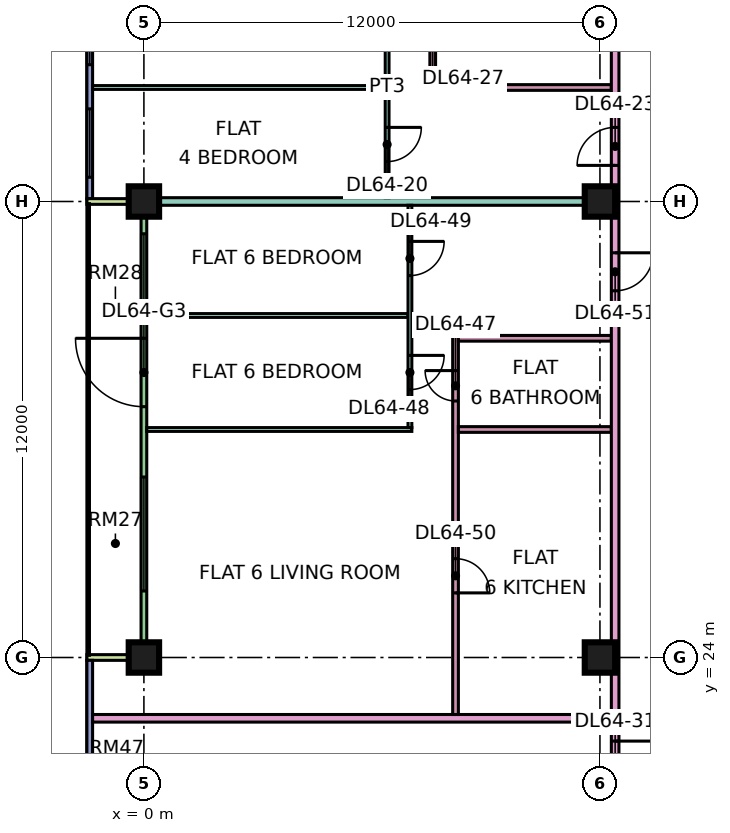
"""IFC4 building model, lengths in metres.
Left out: names, types, materials, properties, quantities, classifications, styles, units other than length and angle.
Written with IfcOpenShell. Run it as: python <this file> out.ifc"""

import sys

from ifc_helpers import new_model, si_unit, direction, frame, frame_2d, origin, origin_2d, place, context, subcontext, project, spatial, rectangle, extrude, element, fill, save


model = new_model("IFC4")
c1 = context("Model", 3, precision=1e-05, world=origin(), true_north=direction((0.0, 1.0)))
c2 = subcontext(c1, "Body", "Model", "MODEL_VIEW")
j1 = project(units=[si_unit("LENGTHUNIT", "METRE"), si_unit("PLANEANGLEUNIT", "RADIAN")], contexts=[c1])
p1 = place(None, origin())
s1 = spatial("IfcSite", under=j1, at=p1, CompositionType="ELEMENT")
p2 = place(p1, origin())
s2 = spatial("IfcBuilding", under=s1, at=p2, CompositionType="ELEMENT")
p3 = place(p2, frame((0.0, 0.0, 277.15)))
s3 = spatial("IfcBuildingStorey", under=s2, at=p3, CompositionType="ELEMENT", Elevation=277.15)
p4 = place(p3, frame((0.0, 24.0, 0.0), z_axis=(0.0, 0.0, 1.0), x_axis=(1.0, 0.0, 0.0)))
e1 = element("IfcColumn", 1, at=p4, inside=s3, PredefinedType="COLUMN", context=c2, shape_type="SweptSolid", body=[
    extrude(rectangle(XDim=0.8, YDim=0.8, at=origin_2d()), origin(), (0.0, 0.0, 1.0), 3.75),
])
p5 = place(p3, frame((0.0, 36.0, 0.0), z_axis=(0.0, 0.0, 1.0), x_axis=(1.0, 0.0, 0.0)))
e2 = element("IfcColumn", 2, at=p5, inside=s3, PredefinedType="COLUMN", context=c2, shape_type="SweptSolid", body=[
    extrude(rectangle(XDim=0.8, YDim=0.8, at=origin_2d()), origin(), (0.0, 0.0, 1.0), 3.75),
])
for number, where, z_axis, x_axis in (
    (3, (12.0, 24.0, 0.0), (0.0, 0.0, 1.0), (1.0, 0.0, 0.0)),
    (4, (12.0, 36.0, 0.0), (0.0, 0.0, 1.0), (1.0, 0.0, 0.0)),
):
    element("IfcColumn", number, at=place(p3, frame(where, z_axis=z_axis, x_axis=x_axis)), inside=s3, PredefinedType="COLUMN", context=c2, shape_type="SweptSolid", body=[
        extrude(rectangle(XDim=0.8, YDim=0.8, at=origin_2d()), origin(), (0.0, 0.0, 1.0), 3.75),
    ])
p6 = place(p3, frame((-1.425, 47.925, 0.0), z_axis=(0.0, 0.0, 1.0), x_axis=(0.0, -1.0, 0.0)))
e5 = element("IfcWall", 5, at=p6, inside=s3, PredefinedType="SOLIDWALL", context=c2, shape_type="SweptSolid", body=[
    extrude(rectangle(XDim=11.85, YDim=0.15, at=frame_2d((5.925, 0.0))), origin(), (0.0, 0.0, 1.0), 3.35),
])
p7 = place(p6, frame((1.462, 0.0, 0.45)))
e6 = element("IfcOpeningElement", 6, at=p7, cuts=e5, PredefinedType="OPENING", context=c2, shape_type="SweptSolid", body=[
    extrude(rectangle(XDim=3.0, YDim=2.4, at=frame_2d((1.5, 1.2))), frame((0.0, 0.085, 0.0), z_axis=(0.0, -1.0, 0.0), x_axis=(1.0, 0.0, 0.0)), (0.0, 0.0, 1.0), 0.17),
])
p8 = place(p6, frame((6.525, 0.0, 0.45)))
e7 = element("IfcOpeningElement", 7, at=p8, cuts=e5, PredefinedType="OPENING", context=c2, shape_type="SweptSolid", body=[
    extrude(rectangle(XDim=1.8, YDim=2.4, at=frame_2d((0.9, 1.2))), frame((0.0, 0.085, 0.0), z_axis=(0.0, -1.0, 0.0), x_axis=(1.0, 0.0, 0.0)), (0.0, 0.0, 1.0), 0.17),
])
p9 = place(p6, frame((9.488, 0.0, 0.45)))
e8 = element("IfcOpeningElement", 8, at=p9, cuts=e5, PredefinedType="OPENING", context=c2, shape_type="SweptSolid", body=[
    extrude(rectangle(XDim=1.8, YDim=2.4, at=frame_2d((0.9, 1.2))), frame((0.0, 0.085, 0.0), z_axis=(0.0, -1.0, 0.0), x_axis=(1.0, 0.0, 0.0)), (0.0, 0.0, 1.0), 0.17),
])
p10 = place(p3, frame((0.0, 35.925, 0.0), z_axis=(0.0, 0.0, 1.0), x_axis=(0.0, -1.0, 0.0)))
e9 = element("IfcWall", 9, at=p10, inside=s3, PredefinedType="SOLIDWALL", context=c2, shape_type="SweptSolid", body=[
    extrude(rectangle(XDim=11.85, YDim=0.15, at=frame_2d((5.925, 0.0))), origin(), (0.0, 0.0, 1.0), 3.35),
])
p11 = place(p10, frame((0.775, 0.0, 0.45)))
e10 = element("IfcOpeningElement", 10, at=p11, cuts=e9, PredefinedType="OPENING", context=c2, shape_type="SweptSolid", body=[
    extrude(rectangle(XDim=1.8, YDim=2.4, at=frame_2d((0.9, 1.2))), frame((0.0, 0.085, 0.0), z_axis=(0.0, -1.0, 0.0), x_axis=(1.0, 0.0, 0.0)), (0.0, 0.0, 1.0), 0.17),
])
p12 = place(p10, frame((3.525, 0.0, 0.0)))
e11 = element("IfcOpeningElement", 11, at=p12, cuts=e9, PredefinedType="OPENING", context=c2, shape_type="SweptSolid", body=[
    extrude(rectangle(XDim=1.8, YDim=2.4, at=frame_2d((0.9, 1.2))), frame((0.0, 0.085, 0.0), z_axis=(0.0, -1.0, 0.0), x_axis=(1.0, 0.0, 0.0)), (0.0, 0.0, 1.0), 0.17),
])
p13 = place(p10, frame((7.175, 0.0, 0.45)))
e12 = element("IfcOpeningElement", 12, at=p13, cuts=e9, PredefinedType="OPENING", context=c2, shape_type="SweptSolid", body=[
    extrude(rectangle(XDim=3.0, YDim=2.4, at=frame_2d((1.5, 1.2))), frame((0.0, 0.085, 0.0), z_axis=(0.0, -1.0, 0.0), x_axis=(1.0, 0.0, 0.0)), (0.0, 0.0, 1.0), 0.17),
])
for number, where, z_axis, x_axis in (
    (13, (-1.5, 36.0, 0.0), (0.0, 0.0, 1.0), (1.0, 0.0, 0.0)),
    (14, (-1.5, 24.0, 0.0), (0.0, 0.0, 1.0), (1.0, 0.0, 0.0)),
):
    element("IfcWall", number, at=place(p3, frame(where, z_axis=z_axis, x_axis=x_axis)), inside=s3, PredefinedType="SOLIDWALL", context=c2, shape_type="SweptSolid", body=[
        extrude(rectangle(XDim=1.5, YDim=0.15, at=frame_2d((0.75, 0.0))), origin(), (0.0, 0.0, 1.0), 3.35),
    ])
p14 = place(p3, frame((-1.425, 23.925, 0.0), z_axis=(0.0, 0.0, 1.0), x_axis=(0.0, -1.0, 0.0)))
e15 = element("IfcWall", 15, at=p14, inside=s3, PredefinedType="SOLIDWALL", context=c2, shape_type="SweptSolid", body=[
    extrude(rectangle(XDim=11.425, YDim=0.15, at=frame_2d((5.712, 0.0))), origin(), (0.0, 0.0, 1.0), 3.35),
])
p15 = place(p14, frame((6.175, 0.0, 0.45)))
e16 = element("IfcOpeningElement", 16, at=p15, cuts=e15, PredefinedType="OPENING", context=c2, shape_type="SweptSolid", body=[
    extrude(rectangle(XDim=3.0, YDim=2.4, at=frame_2d((1.5, 1.2))), frame((0.0, 0.085, 0.0), z_axis=(0.0, -1.0, 0.0), x_axis=(1.0, 0.0, 0.0)), (0.0, 0.0, 1.0), 0.17),
])
p16 = place(p3, frame((-1.351, 39.0, 0.0), z_axis=(0.0, 0.0, 1.0), x_axis=(1.0, 0.0, 0.0)))
e17 = element("IfcWall", 17, at=p16, inside=s3, PredefinedType="PARTITIONING", context=c2, shape_type="SweptSolid", body=[
    extrude(rectangle(XDim=7.701, YDim=0.1, at=frame_2d((3.851, 0.0))), origin(), (0.0, 0.0, 1.0), 3.35),
])
p17 = place(p3, frame((-1.35, 22.4, 0.0), z_axis=(0.0, 0.0, 1.0), x_axis=(1.0, 0.0, 0.0)))
e18 = element("IfcWall", 18, at=p17, inside=s3, PredefinedType="PARTITIONING", context=c2, shape_type="SweptSolid", body=[
    extrude(rectangle(XDim=13.65, YDim=0.2, at=frame_2d((6.825, 0.0))), origin(), (0.0, 0.0, 1.0), 3.35),
])
e19 = element("IfcWall", 19, at=p5, inside=s3, PredefinedType="PARTITIONING", context=c2, shape_type="SweptSolid", body=[
    extrude(rectangle(XDim=12.3, YDim=0.2, at=frame_2d((6.15, 0.0))), origin(), (0.0, 0.0, 1.0), 3.35),
])
p18 = place(p3, frame((0.074, 30.0, 0.0), z_axis=(0.0, 0.0, 1.0), x_axis=(1.0, 0.0, 0.0)))
e20 = element("IfcWall", 20, at=p18, inside=s3, PredefinedType="PARTITIONING", context=c2, shape_type="SweptSolid", body=[
    extrude(rectangle(XDim=6.976, YDim=0.1, at=frame_2d((3.488, 0.0))), origin(), (0.0, 0.0, 1.0), 3.35),
])
p19 = place(p3, frame((0.074, 33.0, 0.0), z_axis=(0.0, 0.0, 1.0), x_axis=(1.0, 0.0, 0.0)))
e21 = element("IfcWall", 21, at=p19, inside=s3, PredefinedType="PARTITIONING", context=c2, shape_type="SweptSolid", body=[
    extrude(rectangle(XDim=6.876, YDim=0.1, at=frame_2d((3.438, 0.0))), origin(), (0.0, 0.0, 1.0), 3.35),
])
p20 = place(p3, frame((6.4, 36.1, 0.0), z_axis=(0.0, 0.0, 1.0), x_axis=(0.0, 1.0, 0.0)))
e22 = element("IfcWall", 22, at=p20, inside=s3, PredefinedType="PARTITIONING", context=c2, shape_type="SweptSolid", body=[
    extrude(rectangle(XDim=5.85, YDim=0.1, at=frame_2d((2.925, 0.0))), origin(), (0.0, 0.0, 1.0), 3.35),
])
p21 = place(p20, frame((0.95, 0.0, 0.0)))
e23 = element("IfcOpeningElement", 23, at=p21, cuts=e22, PredefinedType="OPENING", context=c2, shape_type="SweptSolid", body=[
    extrude(rectangle(XDim=0.9, YDim=2.1, at=frame_2d((0.45, 1.05))), frame((0.0, 0.06, 0.0), z_axis=(0.0, -1.0, 0.0), x_axis=(1.0, 0.0, 0.0)), (0.0, 0.0, 1.0), 0.12),
])
p22 = place(p20, frame((3.95, 0.0, 0.0)))
e24 = element("IfcOpeningElement", 24, at=p22, cuts=e22, PredefinedType="OPENING", context=c2, shape_type="SweptSolid", body=[
    extrude(rectangle(XDim=0.9, YDim=2.1, at=frame_2d((0.45, 1.05))), frame((0.0, 0.06, 0.0), z_axis=(0.0, -1.0, 0.0), x_axis=(1.0, 0.0, 0.0)), (0.0, 0.0, 1.0), 0.12),
])
p23 = place(p3, frame((7.0, 30.05, 0.0), z_axis=(0.0, 0.0, 1.0), x_axis=(0.0, 1.0, 0.0)))
e25 = element("IfcWall", 25, at=p23, inside=s3, PredefinedType="PARTITIONING", context=c2, shape_type="SweptSolid", body=[
    extrude(rectangle(XDim=5.85, YDim=0.1, at=frame_2d((2.925, 0.0))), origin(), (0.0, 0.0, 1.0), 3.35),
])
p24 = place(p23, frame((1.0, 0.0, 0.0)))
e26 = element("IfcOpeningElement", 26, at=p24, cuts=e25, PredefinedType="OPENING", context=c2, shape_type="SweptSolid", body=[
    extrude(rectangle(XDim=0.9, YDim=2.1, at=frame_2d((0.45, 1.05))), frame((0.0, 0.06, 0.0), z_axis=(0.0, -1.0, 0.0), x_axis=(1.0, 0.0, 0.0)), (0.0, 0.0, 1.0), 0.12),
])
p25 = place(p23, frame((4.0, 0.0, 0.0)))
e27 = element("IfcOpeningElement", 27, at=p25, cuts=e25, PredefinedType="OPENING", context=c2, shape_type="SweptSolid", body=[
    extrude(rectangle(XDim=0.9, YDim=2.1, at=frame_2d((0.45, 1.05))), frame((0.0, 0.06, 0.0), z_axis=(0.0, -1.0, 0.0), x_axis=(1.0, 0.0, 0.0)), (0.0, 0.0, 1.0), 0.12),
])
p26 = place(p3, frame((7.6, 38.925, 0.0), z_axis=(0.0, 0.0, 1.0), x_axis=(0.0, 1.0, 0.0)))
e28 = element("IfcWall", 28, at=p26, inside=s3, PredefinedType="PARTITIONING", context=c2, shape_type="SweptSolid", body=[
    extrude(rectangle(XDim=15.001, YDim=0.15, at=frame_2d((7.5, 0.0))), origin(), (0.0, 0.0, 1.0), 3.35),
])
p27 = place(p26, frame((6.825, 0.0, 0.0)))
e29 = element("IfcOpeningElement", 29, at=p27, cuts=e28, PredefinedType="OPENING", context=c2, shape_type="SweptSolid", body=[
    extrude(rectangle(XDim=0.8, YDim=2.1, at=frame_2d((0.4, 1.05))), frame((0.0, 0.085, 0.0), z_axis=(0.0, -1.0, 0.0), x_axis=(1.0, 0.0, 0.0)), (0.0, 0.0, 1.0), 0.17),
])
p28 = place(p26, frame((11.325, 0.0, 0.0)))
e30 = element("IfcOpeningElement", 30, at=p28, cuts=e28, PredefinedType="OPENING", context=c2, shape_type="SweptSolid", body=[
    extrude(rectangle(XDim=0.9, YDim=2.1, at=frame_2d((0.45, 1.05))), frame((0.0, 0.085, 0.0), z_axis=(0.0, -1.0, 0.0), x_axis=(1.0, 0.0, 0.0)), (0.0, 0.0, 1.0), 0.17),
])
p29 = place(p26, frame((1.275, 0.0, 0.0)))
e31 = element("IfcOpeningElement", 31, at=p29, cuts=e28, PredefinedType="OPENING", context=c2, shape_type="SweptSolid", body=[
    extrude(rectangle(XDim=0.8, YDim=2.1, at=frame_2d((0.4, 1.05))), frame((0.0, 0.085, 0.0), z_axis=(0.0, -1.0, 0.0), x_axis=(1.0, 0.0, 0.0)), (0.0, 0.0, 1.0), 0.17),
])
p30 = place(p26, frame((4.275, 0.0, 0.0)))
e32 = element("IfcOpeningElement", 32, at=p30, cuts=e28, PredefinedType="OPENING", context=c2, shape_type="SweptSolid", body=[
    extrude(rectangle(XDim=0.8, YDim=2.1, at=frame_2d((0.4, 1.05))), frame((0.0, 0.085, 0.0), z_axis=(0.0, -1.0, 0.0), x_axis=(1.0, 0.0, 0.0)), (0.0, 0.0, 1.0), 0.17),
])
p31 = place(p3, frame((7.675, 39.0, 0.0), z_axis=(0.0, 0.0, 1.0), x_axis=(1.0, 0.0, 0.0)))
e33 = element("IfcWall", 33, at=p31, inside=s3, PredefinedType="PARTITIONING", context=c2, shape_type="SweptSolid", body=[
    extrude(rectangle(XDim=4.625, YDim=0.15, at=frame_2d((2.312, 0.0))), origin(), (0.0, 0.0, 1.0), 3.35),
])
p32 = place(p3, frame((8.2, 22.5, 0.0), z_axis=(0.0, 0.0, 1.0), x_axis=(0.0, 1.0, 0.0)))
e34 = element("IfcWall", 34, at=p32, inside=s3, PredefinedType="PARTITIONING", context=c2, shape_type="SweptSolid", body=[
    extrude(rectangle(XDim=9.975, YDim=0.15, at=frame_2d((4.988, 0.0))), origin(), (0.0, 0.0, 1.0), 3.35),
])
p33 = place(p32, frame((8.25, 0.0, 0.0)))
e35 = element("IfcOpeningElement", 35, at=p33, cuts=e34, PredefinedType="OPENING", context=c2, shape_type="SweptSolid", body=[
    extrude(rectangle(XDim=0.8, YDim=2.1, at=frame_2d((0.4, 1.05))), frame((0.0, 0.085, 0.0), z_axis=(0.0, -1.0, 0.0), x_axis=(1.0, 0.0, 0.0)), (0.0, 0.0, 1.0), 0.17),
])
p34 = place(p32, frame((3.2, 0.0, 0.0)))
e36 = element("IfcOpeningElement", 36, at=p34, cuts=e34, PredefinedType="OPENING", context=c2, shape_type="SweptSolid", body=[
    extrude(rectangle(XDim=0.9, YDim=2.1, at=frame_2d((0.45, 1.05))), frame((0.0, 0.085, 0.0), z_axis=(0.0, -1.0, 0.0), x_axis=(1.0, 0.0, 0.0)), (0.0, 0.0, 1.0), 0.17),
])
for number, where, z_axis, x_axis in (
    (37, (8.275, 30.0, 0.0), (0.0, 0.0, 1.0), (1.0, 0.0, 0.0)),
    (38, (8.275, 32.4, 0.0), (0.0, 0.0, 1.0), (1.0, 0.0, 0.0)),
):
    element("IfcWall", number, at=place(p3, frame(where, z_axis=z_axis, x_axis=x_axis)), inside=s3, PredefinedType="PARTITIONING", context=c2, shape_type="SweptSolid", body=[
        extrude(rectangle(XDim=4.025, YDim=0.15, at=frame_2d((2.013, 0.0))), origin(), (0.0, 0.0, 1.0), 3.35),
    ])
p35 = place(p3, frame((12.4, 20.0, 0.0), z_axis=(0.0, 0.0, 1.0), x_axis=(0.0, 1.0, 0.0)))
e39 = element("IfcWall", 39, at=p35, inside=s3, PredefinedType="PARTITIONING", context=c2, shape_type="SweptSolid", body=[
    extrude(rectangle(XDim=34.0, YDim=0.2, at=frame_2d((17.0, 0.0))), origin(), (0.0, 0.0, 1.0), 3.35),
])
p36 = place(p35, frame((16.95, 0.0, 0.0)))
e40 = element("IfcOpeningElement", 40, at=p36, cuts=e39, PredefinedType="OPENING", context=c2, shape_type="SweptSolid", body=[
    extrude(rectangle(XDim=1.0, YDim=2.1, at=frame_2d((0.5, 1.05))), frame((0.0, 0.11, 0.0), z_axis=(0.0, -1.0, 0.0), x_axis=(1.0, 0.0, 0.0)), (0.0, 0.0, 1.0), 0.22),
])
p37 = place(p35, frame((0.6, 0.0, 0.0)))
e41 = element("IfcOpeningElement", 41, at=p37, cuts=e39, PredefinedType="OPENING", context=c2, shape_type="SweptSolid", body=[
    extrude(rectangle(XDim=1.2, YDim=2.1, at=frame_2d((0.6, 1.05))), frame((0.0, 0.11, 0.0), z_axis=(0.0, -1.0, 0.0), x_axis=(1.0, 0.0, 0.0)), (0.0, 0.0, 1.0), 0.22),
])
p38 = place(p35, frame((13.65, 0.0, 0.0)))
e42 = element("IfcOpeningElement", 42, at=p38, cuts=e39, PredefinedType="OPENING", context=c2, shape_type="SweptSolid", body=[
    extrude(rectangle(XDim=1.0, YDim=2.1, at=frame_2d((0.5, 1.05))), frame((0.0, 0.11, 0.0), z_axis=(0.0, -1.0, 0.0), x_axis=(1.0, 0.0, 0.0)), (0.0, 0.0, 1.0), 0.22),
])
p39 = place(p8, origin())
e43 = element("IfcWindow", 43, at=p39, inside=s3, PartitioningType="SINGLE_PANEL", PredefinedType="WINDOW", context=c2, shape_type="SweptSolid", body=[
    extrude(rectangle(XDim=1.8, YDim=2.4, at=frame_2d((0.9, 1.2))), frame((0.0, 0.03, 0.0), z_axis=(0.0, -1.0, 0.0), x_axis=(1.0, 0.0, 0.0)), (0.0, 0.0, 1.0), 0.06),
])
fill(e7, e43)
p40 = place(p9, origin())
e44 = element("IfcWindow", 44, at=p40, inside=s3, PartitioningType="SINGLE_PANEL", PredefinedType="WINDOW", context=c2, shape_type="SweptSolid", body=[
    extrude(rectangle(XDim=1.8, YDim=2.4, at=frame_2d((0.9, 1.2))), frame((0.0, 0.03, 0.0), z_axis=(0.0, -1.0, 0.0), x_axis=(1.0, 0.0, 0.0)), (0.0, 0.0, 1.0), 0.06),
])
fill(e8, e44)
p41 = place(p11, origin())
e45 = element("IfcWindow", 45, at=p41, inside=s3, PartitioningType="SINGLE_PANEL", PredefinedType="WINDOW", context=c2, shape_type="SweptSolid", body=[
    extrude(rectangle(XDim=1.8, YDim=2.4, at=frame_2d((0.9, 1.2))), frame((0.0, 0.03, 0.0), z_axis=(0.0, -1.0, 0.0), x_axis=(1.0, 0.0, 0.0)), (0.0, 0.0, 1.0), 0.06),
])
fill(e10, e45)
p42 = place(p12, frame((1.8, 0.0, 0.0), z_axis=(0.0, 0.0, 1.0), x_axis=(-1.0, 0.0, 0.0)))
e46 = element("IfcDoor", 46, at=p42, inside=s3, OperationType="DOUBLE_DOOR_SINGLE_SWING", PredefinedType="DOOR", context=c2, shape_type="SweptSolid", body=[
    extrude(rectangle(XDim=1.8, YDim=2.4, at=frame_2d((0.9, 1.2))), frame((0.0, 0.025, 0.0), z_axis=(0.0, -1.0, 0.0), x_axis=(1.0, 0.0, 0.0)), (0.0, 0.0, 1.0), 0.05),
])
fill(e11, e46)
p43 = place(p13, origin())
e47 = element("IfcWindow", 47, at=p43, inside=s3, PartitioningType="SINGLE_PANEL", PredefinedType="WINDOW", context=c2, shape_type="SweptSolid", body=[
    extrude(rectangle(XDim=3.0, YDim=2.4, at=frame_2d((1.5, 1.2))), frame((0.0, 0.03, 0.0), z_axis=(0.0, -1.0, 0.0), x_axis=(1.0, 0.0, 0.0)), (0.0, 0.0, 1.0), 0.06),
])
fill(e12, e47)
p44 = place(p21, origin())
e48 = element("IfcDoor", 48, at=p44, inside=s3, OperationType="SINGLE_SWING_RIGHT", PredefinedType="DOOR", context=c2, shape_type="SweptSolid", body=[
    extrude(rectangle(XDim=0.9, YDim=2.1, at=frame_2d((0.45, 1.05))), frame((0.0, 0.025, 0.0), z_axis=(0.0, -1.0, 0.0), x_axis=(1.0, 0.0, 0.0)), (0.0, 0.0, 1.0), 0.05),
])
fill(e23, e48)
p45 = place(p36, origin())
e49 = element("IfcDoor", 49, at=p45, inside=s3, OperationType="SINGLE_SWING_LEFT", PredefinedType="DOOR", context=c2, shape_type="SweptSolid", body=[
    extrude(rectangle(XDim=1.0, YDim=2.1, at=frame_2d((0.5, 1.05))), frame((0.0, 0.025, 0.0), z_axis=(0.0, -1.0, 0.0), x_axis=(1.0, 0.0, 0.0)), (0.0, 0.0, 1.0), 0.05),
])
fill(e40, e49)
p46 = place(p37, origin())
e50 = element("IfcDoor", 50, at=p46, inside=s3, OperationType="SINGLE_SWING_RIGHT", PredefinedType="DOOR", context=c2, shape_type="SweptSolid", body=[
    extrude(rectangle(XDim=1.2, YDim=2.1, at=frame_2d((0.6, 1.05))), frame((0.0, 0.025, 0.0), z_axis=(0.0, -1.0, 0.0), x_axis=(1.0, 0.0, 0.0)), (0.0, 0.0, 1.0), 0.05),
])
fill(e41, e50)
p47 = place(p33, frame((0.8, 0.0, 0.0), z_axis=(0.0, 0.0, 1.0), x_axis=(-1.0, 0.0, 0.0)))
e51 = element("IfcDoor", 51, at=p47, inside=s3, OperationType="SINGLE_SWING_RIGHT", PredefinedType="DOOR", context=c2, shape_type="SweptSolid", body=[
    extrude(rectangle(XDim=0.8, YDim=2.1, at=frame_2d((0.4, 1.05))), frame((0.0, 0.025, 0.0), z_axis=(0.0, -1.0, 0.0), x_axis=(1.0, 0.0, 0.0)), (0.0, 0.0, 1.0), 0.05),
])
fill(e35, e51)
p48 = place(p24, origin())
e52 = element("IfcDoor", 52, at=p48, inside=s3, OperationType="SINGLE_SWING_RIGHT", PredefinedType="DOOR", context=c2, shape_type="SweptSolid", body=[
    extrude(rectangle(XDim=0.9, YDim=2.1, at=frame_2d((0.45, 1.05))), frame((0.0, 0.025, 0.0), z_axis=(0.0, -1.0, 0.0), x_axis=(1.0, 0.0, 0.0)), (0.0, 0.0, 1.0), 0.05),
])
fill(e26, e52)
p49 = place(p25, origin())
e53 = element("IfcDoor", 53, at=p49, inside=s3, OperationType="SINGLE_SWING_RIGHT", PredefinedType="DOOR", context=c2, shape_type="SweptSolid", body=[
    extrude(rectangle(XDim=0.9, YDim=2.1, at=frame_2d((0.45, 1.05))), frame((0.0, 0.025, 0.0), z_axis=(0.0, -1.0, 0.0), x_axis=(1.0, 0.0, 0.0)), (0.0, 0.0, 1.0), 0.05),
])
fill(e27, e53)
p50 = place(p34, frame((0.9, 0.0, 0.0), z_axis=(0.0, 0.0, 1.0), x_axis=(-1.0, 0.0, 0.0)))
e54 = element("IfcDoor", 54, at=p50, inside=s3, OperationType="SINGLE_SWING_LEFT", PredefinedType="DOOR", context=c2, shape_type="SweptSolid", body=[
    extrude(rectangle(XDim=0.9, YDim=2.1, at=frame_2d((0.45, 1.05))), frame((0.0, 0.025, 0.0), z_axis=(0.0, -1.0, 0.0), x_axis=(1.0, 0.0, 0.0)), (0.0, 0.0, 1.0), 0.05),
])
fill(e36, e54)
p51 = place(p38, origin())
e55 = element("IfcDoor", 55, at=p51, inside=s3, OperationType="SINGLE_SWING_RIGHT", PredefinedType="DOOR", context=c2, shape_type="SweptSolid", body=[
    extrude(rectangle(XDim=1.0, YDim=2.1, at=frame_2d((0.5, 1.05))), frame((0.0, 0.025, 0.0), z_axis=(0.0, -1.0, 0.0), x_axis=(1.0, 0.0, 0.0)), (0.0, 0.0, 1.0), 0.05),
])
fill(e42, e55)
save(model, sys.argv[1])
